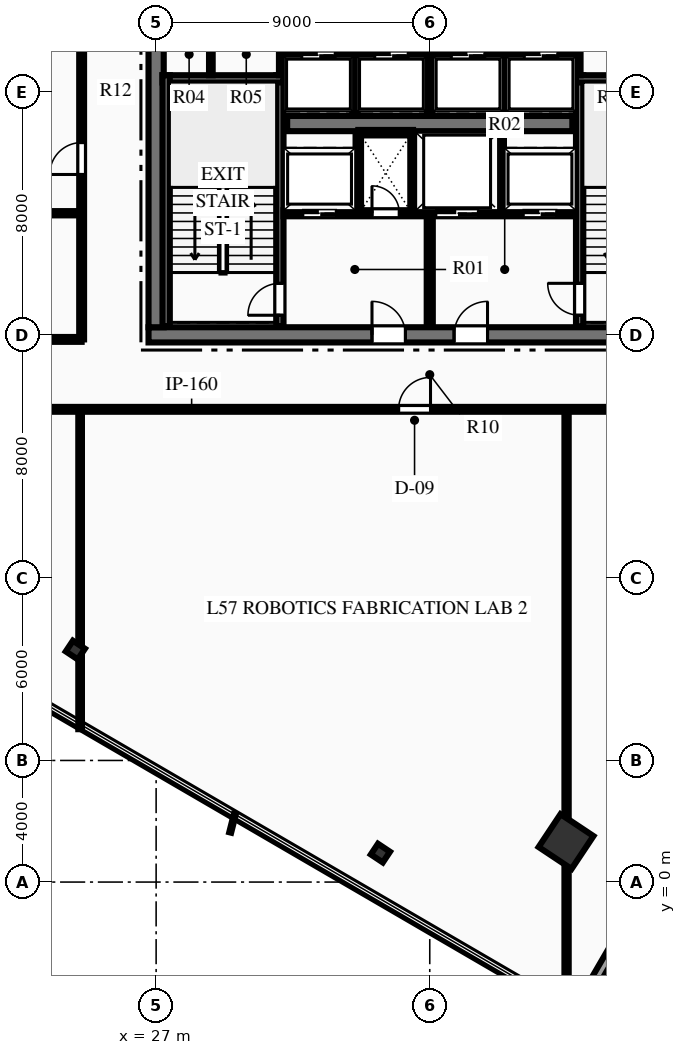
"""IFC4 building model, lengths in metres.
Left out: names, types, materials, properties, quantities, classifications, styles, units other than length and angle.
Written with IfcOpenShell. Run it as: python <this file> out.ifc"""

import sys

from ifc_helpers import new_model, si_unit, direction, frame, frame_2d, origin, origin_2d, place, context, subcontext, project, spatial, rectangle, hollow_rectangle, i_section, extrude, element, fill, save


model = new_model("IFC4")
c1 = context("Model", 3, precision=1e-05, world=origin(), true_north=direction((0.0, 1.0)))
c2 = subcontext(c1, "Body", "Model", "MODEL_VIEW")
j1 = project(units=[si_unit("LENGTHUNIT", "METRE"), si_unit("PLANEANGLEUNIT", "RADIAN")], contexts=[c1])
p1 = place(None, origin())
s1 = spatial("IfcSite", under=j1, at=p1, CompositionType="ELEMENT")
p2 = place(p1, origin())
s2 = spatial("IfcBuilding", under=s1, at=p2, CompositionType="ELEMENT")
p3 = place(p2, frame((0.0, 0.0, 228.45)))
s3 = spatial("IfcBuildingStorey", under=s2, at=p3, CompositionType="ELEMENT", Elevation=228.45)
p4 = place(p3, frame((26.75, 18.0, 0.0), z_axis=(0.0, 0.0, 1.0), x_axis=(1.0, 0.0, 0.0)))
e1 = element("IfcWall", 1, at=p4, inside=s3, PredefinedType="SHEAR", context=c2, shape_type="SweptSolid", body=[
    extrude(rectangle(XDim=18.5, YDim=0.5, at=frame_2d((9.25, 0.0))), origin(), (0.0, 0.0, 1.0), 3.75),
])
p5 = place(p4, frame((7.35, 0.0, 0.0)))
e2 = element("IfcOpeningElement", 2, at=p5, cuts=e1, PredefinedType="OPENING", context=c2, shape_type="SweptSolid", body=[
    extrude(rectangle(XDim=1.1, YDim=2.15, at=frame_2d((0.55, 1.075))), frame((0.0, 0.26, 0.0), z_axis=(0.0, -1.0, 0.0), x_axis=(1.0, 0.0, 0.0)), (0.0, 0.0, 1.0), 0.52),
])
p6 = place(p4, frame((10.05, 0.0, 0.0)))
e3 = element("IfcOpeningElement", 3, at=p6, cuts=e1, PredefinedType="OPENING", context=c2, shape_type="SweptSolid", body=[
    extrude(rectangle(XDim=1.1, YDim=2.15, at=frame_2d((0.55, 1.075))), frame((0.0, 0.26, 0.0), z_axis=(0.0, -1.0, 0.0), x_axis=(1.0, 0.0, 0.0)), (0.0, 0.0, 1.0), 0.52),
])
p7 = place(p3, frame((27.0, 18.25, 0.0), z_axis=(0.0, 0.0, 1.0), x_axis=(0.0, 1.0, 0.0)))
e4 = element("IfcWall", 4, at=p7, inside=s3, PredefinedType="SHEAR", context=c2, shape_type="SweptSolid", body=[
    extrude(rectangle(XDim=15.5, YDim=0.5, at=frame_2d((7.75, 0.0))), origin(), (0.0, 0.0, 1.0), 3.75),
])
p8 = place(p7, frame((9.99, 0.0, 0.0)))
e5 = element("IfcOpeningElement", 5, at=p8, cuts=e4, PredefinedType="OPENING", context=c2, shape_type="SweptSolid", body=[
    extrude(rectangle(XDim=1.4, YDim=2.2, at=frame_2d((0.7, 1.1))), frame((0.0, 0.26, 0.0), z_axis=(0.0, -1.0, 0.0), x_axis=(1.0, 0.0, 0.0)), (0.0, 0.0, 1.0), 0.52),
])
p9 = place(p3, frame((31.31, 24.95, 0.0), z_axis=(0.0, 0.0, 1.0), x_axis=(1.0, 0.0, 0.0)))
e6 = element("IfcWall", 6, at=p9, inside=s3, PredefinedType="SHEAR", context=c2, shape_type="SweptSolid", body=[
    extrude(rectangle(XDim=9.38, YDim=0.5, at=frame_2d((4.69, 0.0))), origin(), (0.0, 0.0, 1.0), 3.75),
])
p10 = place(p3, frame((31.07, 18.28, 0.0), z_axis=(0.0, 0.0, 1.0), x_axis=(0.0, 1.0, 0.0)))
e7 = element("IfcWall", 7, at=p10, inside=s3, PredefinedType="SHEAR", context=c2, shape_type="SweptSolid", body=[
    extrude(rectangle(XDim=8.26, YDim=0.24, at=frame_2d((4.13, 0.0))), origin(), (0.0, 0.0, 1.0), 3.75),
])
p11 = place(p10, frame((0.365, 0.0, 0.0)))
e8 = element("IfcOpeningElement", 8, at=p11, cuts=e7, PredefinedType="OPENING", context=c2, shape_type="SweptSolid", body=[
    extrude(rectangle(XDim=1.05, YDim=2.15, at=frame_2d((0.525, 1.075))), frame((0.0, 0.13, 0.0), z_axis=(0.0, -1.0, 0.0), x_axis=(1.0, 0.0, 0.0)), (0.0, 0.0, 1.0), 0.26),
])
p12 = place(p3, frame((27.21, 26.42, 0.0), z_axis=(0.0, 0.0, 1.0), x_axis=(1.0, 0.0, 0.0)))
e9 = element("IfcWall", 9, at=p12, inside=s3, PredefinedType="SHEAR", context=c2, shape_type="SweptSolid", body=[
    extrude(rectangle(XDim=3.98, YDim=0.24, at=frame_2d((1.99, 0.0))), origin(), (0.0, 0.0, 1.0), 3.75),
])
p13 = place(p3, frame((27.33, 18.28, 0.0), z_axis=(0.0, 0.0, 1.0), x_axis=(0.0, 1.0, 0.0)))
e10 = element("IfcWall", 10, at=p13, inside=s3, PredefinedType="SHEAR", context=c2, shape_type="SweptSolid", body=[
    extrude(rectangle(XDim=8.26, YDim=0.24, at=frame_2d((4.13, 0.0))), origin(), (0.0, 0.0, 1.0), 3.75),
])
p14 = place(p3, frame((40.93, 18.28, 0.0), z_axis=(0.0, 0.0, 1.0), x_axis=(0.0, 1.0, 0.0)))
e11 = element("IfcWall", 11, at=p14, inside=s3, PredefinedType="SHEAR", context=c2, shape_type="SweptSolid", body=[
    extrude(rectangle(XDim=8.26, YDim=0.24, at=frame_2d((4.13, 0.0))), origin(), (0.0, 0.0, 1.0), 3.75),
])
p15 = place(p14, frame((0.365, 0.0, 0.0)))
e12 = element("IfcOpeningElement", 12, at=p15, cuts=e11, PredefinedType="OPENING", context=c2, shape_type="SweptSolid", body=[
    extrude(rectangle(XDim=1.05, YDim=2.15, at=frame_2d((0.525, 1.075))), frame((0.0, 0.13, 0.0), z_axis=(0.0, -1.0, 0.0), x_axis=(1.0, 0.0, 0.0)), (0.0, 0.0, 1.0), 0.26),
])
p16 = place(p3, frame((40.81, 26.42, 0.0), z_axis=(0.0, 0.0, 1.0), x_axis=(1.0, 0.0, 0.0)))
e13 = element("IfcWall", 13, at=p16, inside=s3, PredefinedType="SHEAR", context=c2, shape_type="SweptSolid", body=[
    extrude(rectangle(XDim=3.98, YDim=0.24, at=frame_2d((1.99, 0.0))), origin(), (0.0, 0.0, 1.0), 3.75),
])
p17 = place(p3, frame((40.483, 1.333, 0.0), z_axis=(0.0, 0.0, 1.0), x_axis=(0.554118199338, 0.832437998389, 0.0)))
e14 = element("IfcColumn", 14, at=p17, inside=s3, PredefinedType="COLUMN", context=c2, shape_type="SweptSolid", body=[
    extrude(hollow_rectangle(XDim=1.3, YDim=1.3, WallThickness=0.06, at=origin_2d()), origin(), (0.0, 0.0, 1.0), 3.75),
])
for number, where, z_axis, x_axis in (
    (15, (24.343, 7.631, 0.0), (0.0, 0.0, 1.0), (0.554, 0.832, 0.0)),
    (16, (34.377, 0.952, 0.0), (0.0, 0.0, 1.0), (0.554, 0.832, 0.0)),
):
    element("IfcColumn", number, at=place(p3, frame(where, z_axis=z_axis, x_axis=x_axis)), inside=s3, PredefinedType="COLUMN", context=c2, shape_type="SweptSolid", body=[
        extrude(i_section(OverallWidth=0.424, OverallDepth=0.474, WebThickness=0.048, FlangeThickness=0.077, at=origin_2d()), origin(), (0.0, 0.0, 1.0), 3.75),
    ])
p18 = place(p3, frame((42.703, -1.1, 0.0), z_axis=(0.0, 0.0, 1.0), x_axis=(-0.503006671867, -0.864282527914, 0.0)))
e17 = element("IfcWall", 17, at=p18, inside=s3, PredefinedType="STANDARD", context=c2, shape_type="SweptSolid", body=[
    extrude(rectangle(XDim=3.9, YDim=0.32, at=frame_2d((1.95, 0.0))), origin(), (0.0, 0.0, 1.0), 3.47),
])
p19 = place(p3, frame((36.0, 18.28, 0.0), z_axis=(0.0, 0.0, 1.0), x_axis=(0.0, 1.0, 0.0)))
e18 = element("IfcWall", 18, at=p19, inside=s3, PredefinedType="PARTITIONING", context=c2, shape_type="SweptSolid", body=[
    extrude(rectangle(XDim=3.77, YDim=0.2, at=frame_2d((1.885, 0.0))), origin(), (0.0, 0.0, 1.0), 3.47),
])
p20 = place(p3, frame((31.19, 22.0, 0.0), z_axis=(0.0, 0.0, 1.0), x_axis=(1.0, 0.0, 0.0)))
e19 = element("IfcWall", 19, at=p20, inside=s3, PredefinedType="PARTITIONING", context=c2, shape_type="SweptSolid", body=[
    extrude(rectangle(XDim=4.69, YDim=0.2, at=frame_2d((2.345, 0.0))), origin(), (0.0, 0.0, 1.0), 3.47),
])
p21 = place(p20, frame((2.91, 0.0, 0.0)))
e20 = element("IfcOpeningElement", 20, at=p21, cuts=e19, PredefinedType="OPENING", context=c2, shape_type="SweptSolid", body=[
    extrude(rectangle(XDim=0.9, YDim=2.15, at=frame_2d((0.45, 1.075))), frame((0.0, 0.11, 0.0), z_axis=(0.0, -1.0, 0.0), x_axis=(1.0, 0.0, 0.0)), (0.0, 0.0, 1.0), 0.22),
])
p22 = place(p20, frame((0.635, 0.0, 0.0)))
e21 = element("IfcOpeningElement", 21, at=p22, cuts=e19, PredefinedType="OPENING", context=c2, shape_type="SweptSolid", body=[
    extrude(rectangle(XDim=1.1, YDim=2.15, at=frame_2d((0.55, 1.075))), frame((0.0, 0.11, 0.0), z_axis=(0.0, -1.0, 0.0), x_axis=(1.0, 0.0, 0.0)), (0.0, 0.0, 1.0), 0.22),
])
p23 = place(p3, frame((36.12, 22.0, 0.0), z_axis=(0.0, 0.0, 1.0), x_axis=(1.0, 0.0, 0.0)))
e22 = element("IfcWall", 22, at=p23, inside=s3, PredefinedType="PARTITIONING", context=c2, shape_type="SweptSolid", body=[
    extrude(rectangle(XDim=4.69, YDim=0.2, at=frame_2d((2.345, 0.0))), origin(), (0.0, 0.0, 1.0), 3.47),
])
p24 = place(p23, frame((2.955, 0.0, 0.0)))
e23 = element("IfcOpeningElement", 23, at=p24, cuts=e22, PredefinedType="OPENING", context=c2, shape_type="SweptSolid", body=[
    extrude(rectangle(XDim=1.1, YDim=2.15, at=frame_2d((0.55, 1.075))), frame((0.0, 0.11, 0.0), z_axis=(0.0, -1.0, 0.0), x_axis=(1.0, 0.0, 0.0)), (0.0, 0.0, 1.0), 0.22),
])
p25 = place(p23, frame((0.08, 0.0, 0.0)))
e24 = element("IfcOpeningElement", 24, at=p25, cuts=e22, PredefinedType="OPENING", context=c2, shape_type="SweptSolid", body=[
    extrude(rectangle(XDim=1.4, YDim=2.2, at=frame_2d((0.7, 1.1))), frame((0.0, 0.11, 0.0), z_axis=(0.0, -1.0, 0.0), x_axis=(1.0, 0.0, 0.0)), (0.0, 0.0, 1.0), 0.22),
])
for number, where, z_axis, x_axis in (
    (25, (33.65, 22.05, 0.0), (0.0, 0.0, 1.0), (0.0, 1.0, 0.0)),
    (26, (35.45, 22.05, 0.0), (0.0, 0.0, 1.0), (0.0, 1.0, 0.0)),
):
    element("IfcWall", number, at=place(p3, frame(where, z_axis=z_axis, x_axis=x_axis)), inside=s3, PredefinedType="PARTITIONING", context=c2, shape_type="SweptSolid", body=[
        extrude(rectangle(XDim=2.6, YDim=0.18, at=frame_2d((1.3, 0.0))), origin(), (0.0, 0.0, 1.0), 3.47),
    ])
p26 = place(p3, frame((33.65, 24.65, 0.0), z_axis=(0.0, 0.0, 1.0), x_axis=(1.0, 0.0, 0.0)))
e27 = element("IfcWall", 27, at=p26, inside=s3, PredefinedType="PARTITIONING", context=c2, shape_type="SweptSolid", body=[
    extrude(rectangle(XDim=1.8, YDim=0.18, at=frame_2d((0.9, 0.0))), origin(), (0.0, 0.0, 1.0), 3.47),
])
p27 = place(p3, frame((38.35, 22.05, 0.0), z_axis=(0.0, 0.0, 1.0), x_axis=(0.0, 1.0, 0.0)))
e28 = element("IfcWall", 28, at=p27, inside=s3, PredefinedType="PARTITIONING", context=c2, shape_type="SweptSolid", body=[
    extrude(rectangle(XDim=2.6, YDim=0.18, at=frame_2d((1.3, 0.0))), origin(), (0.0, 0.0, 1.0), 3.47),
])
for number, where, z_axis, x_axis in (
    (29, (31.12, 26.54, 0.0), (0.0, 0.0, 1.0), (0.0, 1.0, 0.0)),
    (30, (40.88, 26.54, 0.0), (0.0, 0.0, 1.0), (0.0, 1.0, 0.0)),
):
    element("IfcWall", number, at=place(p3, frame(where, z_axis=z_axis, x_axis=x_axis)), inside=s3, PredefinedType="PARTITIONING", context=c2, shape_type="SweptSolid", body=[
        extrude(rectangle(XDim=1.51, YDim=0.16, at=frame_2d((0.755, 0.0))), origin(), (0.0, 0.0, 1.0), 3.47),
    ])
p28 = place(p3, frame((28.8, 26.54, 0.0), z_axis=(0.0, 0.0, 1.0), x_axis=(0.0, 1.0, 0.0)))
e31 = element("IfcWall", 31, at=p28, inside=s3, PredefinedType="PARTITIONING", context=c2, shape_type="SweptSolid", body=[
    extrude(rectangle(XDim=1.44, YDim=0.12, at=frame_2d((0.72, 0.0))), origin(), (0.0, 0.0, 1.0), 3.47),
])
p29 = place(p3, frame((31.2, 27.2, 0.0), z_axis=(0.0, 0.0, 1.0), x_axis=(1.0, 0.0, 0.0)))
e32 = element("IfcWall", 32, at=p29, inside=s3, PredefinedType="PARTITIONING", context=c2, shape_type="SweptSolid", body=[
    extrude(rectangle(XDim=9.6, YDim=0.18, at=frame_2d((4.8, 0.0))), origin(), (0.0, 0.0, 1.0), 3.47),
])
p30 = place(p29, frame((0.59, 0.0, 0.0)))
e33 = element("IfcOpeningElement", 33, at=p30, cuts=e32, PredefinedType="OPENING", context=c2, shape_type="SweptSolid", body=[
    extrude(rectangle(XDim=1.1, YDim=2.15, at=frame_2d((0.55, 1.075))), frame((0.0, 0.1, 0.0), z_axis=(0.0, -1.0, 0.0), x_axis=(1.0, 0.0, 0.0)), (0.0, 0.0, 1.0), 0.2),
])
p31 = place(p29, frame((2.99, 0.0, 0.0)))
e34 = element("IfcOpeningElement", 34, at=p31, cuts=e32, PredefinedType="OPENING", context=c2, shape_type="SweptSolid", body=[
    extrude(rectangle(XDim=1.1, YDim=2.15, at=frame_2d((0.55, 1.075))), frame((0.0, 0.1, 0.0), z_axis=(0.0, -1.0, 0.0), x_axis=(1.0, 0.0, 0.0)), (0.0, 0.0, 1.0), 0.2),
])
p32 = place(p29, frame((5.51, 0.0, 0.0)))
e35 = element("IfcOpeningElement", 35, at=p32, cuts=e32, PredefinedType="OPENING", context=c2, shape_type="SweptSolid", body=[
    extrude(rectangle(XDim=1.1, YDim=2.15, at=frame_2d((0.55, 1.075))), frame((0.0, 0.1, 0.0), z_axis=(0.0, -1.0, 0.0), x_axis=(1.0, 0.0, 0.0)), (0.0, 0.0, 1.0), 0.2),
])
p33 = place(p29, frame((7.91, 0.0, 0.0)))
e36 = element("IfcOpeningElement", 36, at=p33, cuts=e32, PredefinedType="OPENING", context=c2, shape_type="SweptSolid", body=[
    extrude(rectangle(XDim=1.1, YDim=2.15, at=frame_2d((0.55, 1.075))), frame((0.0, 0.1, 0.0), z_axis=(0.0, -1.0, 0.0), x_axis=(1.0, 0.0, 0.0)), (0.0, 0.0, 1.0), 0.2),
])
for number, where, z_axis, x_axis in (
    (37, (33.54, 25.3, 0.0), (0.0, 0.0, 1.0), (0.0, 1.0, 0.0)),
    (38, (36.0, 25.3, 0.0), (0.0, 0.0, 1.0), (0.0, 1.0, 0.0)),
    (39, (38.46, 25.3, 0.0), (0.0, 0.0, 1.0), (0.0, 1.0, 0.0)),
):
    element("IfcWall", number, at=place(p3, frame(where, z_axis=z_axis, x_axis=x_axis)), inside=s3, PredefinedType="PARTITIONING", context=c2, shape_type="SweptSolid", body=[
        extrude(rectangle(XDim=1.9, YDim=0.18, at=frame_2d((0.95, 0.0))), origin(), (0.0, 0.0, 1.0), 3.47),
    ])
p34 = place(p3, frame((18.2, 15.55, 0.0), z_axis=(0.0, 0.0, 1.0), x_axis=(1.0, 0.0, 0.0)))
e40 = element("IfcWall", 40, at=p34, inside=s3, PredefinedType="PARTITIONING", context=c2, shape_type="SweptSolid", body=[
    extrude(rectangle(XDim=35.6, YDim=0.16, at=frame_2d((17.8, 0.0))), origin(), (0.0, 0.0, 1.0), 3.008),
])
p35 = place(p34, frame((3.587, 0.0, 0.0)))
e41 = element("IfcOpeningElement", 41, at=p35, cuts=e40, PredefinedType="OPENING", context=c2, shape_type="SweptSolid", body=[
    extrude(rectangle(XDim=1.05, YDim=2.15, at=frame_2d((0.525, 1.075))), frame((0.0, 0.09, 0.0), z_axis=(0.0, -1.0, 0.0), x_axis=(1.0, 0.0, 0.0)), (0.0, 0.0, 1.0), 0.18),
])
p36 = place(p34, frame((16.775, 0.0, 0.0)))
e42 = element("IfcOpeningElement", 42, at=p36, cuts=e40, PredefinedType="OPENING", context=c2, shape_type="SweptSolid", body=[
    extrude(rectangle(XDim=1.05, YDim=2.15, at=frame_2d((0.525, 1.075))), frame((0.0, 0.09, 0.0), z_axis=(0.0, -1.0, 0.0), x_axis=(1.0, 0.0, 0.0)), (0.0, 0.0, 1.0), 0.18),
])
p37 = place(p34, frame((24.055, 0.0, 0.0)))
e43 = element("IfcOpeningElement", 43, at=p37, cuts=e40, PredefinedType="OPENING", context=c2, shape_type="SweptSolid", body=[
    extrude(rectangle(XDim=1.05, YDim=2.15, at=frame_2d((0.525, 1.075))), frame((0.0, 0.09, 0.0), z_axis=(0.0, -1.0, 0.0), x_axis=(1.0, 0.0, 0.0)), (0.0, 0.0, 1.0), 0.18),
])
p38 = place(p34, frame((30.905, 0.0, 0.0)))
e44 = element("IfcOpeningElement", 44, at=p38, cuts=e40, PredefinedType="OPENING", context=c2, shape_type="SweptSolid", body=[
    extrude(rectangle(XDim=1.05, YDim=2.15, at=frame_2d((0.525, 1.075))), frame((0.0, 0.09, 0.0), z_axis=(0.0, -1.0, 0.0), x_axis=(1.0, 0.0, 0.0)), (0.0, 0.0, 1.0), 0.18),
])
p39 = place(p3, frame((18.2, 17.85, 0.0), z_axis=(0.0, 0.0, 1.0), x_axis=(1.0, 0.0, 0.0)))
e45 = element("IfcWall", 45, at=p39, inside=s3, PredefinedType="PARTITIONING", context=c2, shape_type="SweptSolid", body=[
    extrude(rectangle(XDim=6.35, YDim=0.16, at=frame_2d((3.175, 0.0))), origin(), (0.0, 0.0, 1.0), 3.47),
])
p40 = place(p39, frame((3.793, 0.0, 0.0)))
e46 = element("IfcOpeningElement", 46, at=p40, cuts=e45, PredefinedType="OPENING", context=c2, shape_type="SweptSolid", body=[
    extrude(rectangle(XDim=1.05, YDim=2.15, at=frame_2d((0.525, 1.075))), frame((0.0, 0.09, 0.0), z_axis=(0.0, -1.0, 0.0), x_axis=(1.0, 0.0, 0.0)), (0.0, 0.0, 1.0), 0.18),
])
p41 = place(p3, frame((24.55, 17.85, 0.0), z_axis=(0.0, 0.0, 1.0), x_axis=(0.0, 1.0, 0.0)))
e47 = element("IfcWall", 47, at=p41, inside=s3, PredefinedType="PARTITIONING", context=c2, shape_type="SweptSolid", body=[
    extrude(rectangle(XDim=16.3, YDim=0.16, at=frame_2d((8.15, 0.0))), origin(), (0.0, 0.0, 1.0), 3.47),
])
p42 = place(p41, frame((5.425, 0.0, 0.0)))
e48 = element("IfcOpeningElement", 48, at=p42, cuts=e47, PredefinedType="OPENING", context=c2, shape_type="SweptSolid", body=[
    extrude(rectangle(XDim=1.05, YDim=2.15, at=frame_2d((0.525, 1.075))), frame((0.0, 0.09, 0.0), z_axis=(0.0, -1.0, 0.0), x_axis=(1.0, 0.0, 0.0)), (0.0, 0.0, 1.0), 0.18),
])
p43 = place(p41, frame((11.367, 0.0, 0.0)))
e49 = element("IfcOpeningElement", 49, at=p43, cuts=e47, PredefinedType="OPENING", context=c2, shape_type="SweptSolid", body=[
    extrude(rectangle(XDim=1.05, YDim=2.15, at=frame_2d((0.525, 1.075))), frame((0.0, 0.09, 0.0), z_axis=(0.0, -1.0, 0.0), x_axis=(1.0, 0.0, 0.0)), (0.0, 0.0, 1.0), 0.18),
])
p44 = place(p3, frame((24.5, 5.028, 0.0), z_axis=(0.0, 0.0, 1.0), x_axis=(0.0, 1.0, 0.0)))
e50 = element("IfcWall", 50, at=p44, inside=s3, PredefinedType="PARTITIONING", context=c2, shape_type="SweptSolid", body=[
    extrude(rectangle(XDim=10.522, YDim=0.12, at=frame_2d((5.261, 0.0))), origin(), (0.0, 0.0, 1.0), 2.849),
])
p45 = place(p3, frame((40.5, -4.284, 0.0), z_axis=(0.0, 0.0, 1.0), x_axis=(0.0, 1.0, 0.0)))
e51 = element("IfcWall", 51, at=p45, inside=s3, PredefinedType="PARTITIONING", context=c2, shape_type="SweptSolid", body=[
    extrude(rectangle(XDim=19.834, YDim=0.14, at=frame_2d((9.917, 0.0))), origin(), (0.0, 0.0, 1.0), 2.849),
])
p46 = place(p3, frame((7.858, 22.0, 0.0), z_axis=(0.0, 0.0, 1.0), x_axis=(1.0, 0.0, 0.0)))
e52 = element("IfcWall", 52, at=p46, inside=s3, PredefinedType="PARTITIONING", context=c2, shape_type="SweptSolid", body=[
    extrude(rectangle(XDim=16.692, YDim=0.14, at=frame_2d((8.346, 0.0))), origin(), (0.0, 0.0, 1.0), 3.47),
])
p47 = place(p11, origin())
e53 = element("IfcDoor", 53, at=p47, inside=s3, OperationType="SINGLE_SWING_LEFT", PredefinedType="DOOR", context=c2, shape_type="SweptSolid", body=[
    extrude(rectangle(XDim=1.05, YDim=2.15, at=frame_2d((0.525, 1.075))), frame((0.0, 0.025, 0.0), z_axis=(0.0, -1.0, 0.0), x_axis=(1.0, 0.0, 0.0)), (0.0, 0.0, 1.0), 0.05),
])
fill(e8, e53)
p48 = place(p15, origin())
e54 = element("IfcDoor", 54, at=p48, inside=s3, OperationType="SINGLE_SWING_RIGHT", PredefinedType="DOOR", context=c2, shape_type="SweptSolid", body=[
    extrude(rectangle(XDim=1.05, YDim=2.15, at=frame_2d((0.525, 1.075))), frame((0.0, 0.025, 0.0), z_axis=(0.0, -1.0, 0.0), x_axis=(1.0, 0.0, 0.0)), (0.0, 0.0, 1.0), 0.05),
])
fill(e12, e54)
p49 = place(p5, origin())
e55 = element("IfcDoor", 55, at=p49, inside=s3, OperationType="SINGLE_SWING_LEFT", PredefinedType="DOOR", context=c2, shape_type="SweptSolid", body=[
    extrude(rectangle(XDim=1.1, YDim=2.15, at=frame_2d((0.55, 1.075))), frame((0.0, 0.025, 0.0), z_axis=(0.0, -1.0, 0.0), x_axis=(1.0, 0.0, 0.0)), (0.0, 0.0, 1.0), 0.05),
])
fill(e2, e55)
p50 = place(p6, origin())
e56 = element("IfcDoor", 56, at=p50, inside=s3, OperationType="SINGLE_SWING_RIGHT", PredefinedType="DOOR", context=c2, shape_type="SweptSolid", body=[
    extrude(rectangle(XDim=1.1, YDim=2.15, at=frame_2d((0.55, 1.075))), frame((0.0, 0.025, 0.0), z_axis=(0.0, -1.0, 0.0), x_axis=(1.0, 0.0, 0.0)), (0.0, 0.0, 1.0), 0.05),
])
fill(e3, e56)
p51 = place(p21, origin())
e57 = element("IfcDoor", 57, at=p51, inside=s3, OperationType="SINGLE_SWING_LEFT", PredefinedType="DOOR", context=c2, shape_type="SweptSolid", body=[
    extrude(rectangle(XDim=0.9, YDim=2.15, at=frame_2d((0.45, 1.075))), frame((0.0, 0.025, 0.0), z_axis=(0.0, -1.0, 0.0), x_axis=(1.0, 0.0, 0.0)), (0.0, 0.0, 1.0), 0.05),
])
fill(e20, e57)
p52 = place(p36, origin())
e58 = element("IfcDoor", 58, at=p52, inside=s3, OperationType="SINGLE_SWING_RIGHT", PredefinedType="DOOR", context=c2, shape_type="SweptSolid", body=[
    extrude(rectangle(XDim=1.05, YDim=2.15, at=frame_2d((0.525, 1.075))), frame((0.0, 0.025, 0.0), z_axis=(0.0, -1.0, 0.0), x_axis=(1.0, 0.0, 0.0)), (0.0, 0.0, 1.0), 0.05),
])
fill(e42, e58)
p53 = place(p42, origin())
e59 = element("IfcDoor", 59, at=p53, inside=s3, OperationType="SINGLE_SWING_LEFT", PredefinedType="DOOR", context=c2, shape_type="SweptSolid", body=[
    extrude(rectangle(XDim=1.05, YDim=2.15, at=frame_2d((0.525, 1.075))), frame((0.0, 0.025, 0.0), z_axis=(0.0, -1.0, 0.0), x_axis=(1.0, 0.0, 0.0)), (0.0, 0.0, 1.0), 0.05),
])
fill(e48, e59)
p54 = place(p30, origin())
e60 = element("IfcDoor", 60, at=p54, inside=s3, OperationType="SLIDING_TO_LEFT", PredefinedType="DOOR", context=c2, shape_type="SweptSolid", body=[
    extrude(rectangle(XDim=1.1, YDim=2.15, at=frame_2d((0.55, 1.075))), frame((0.0, 0.025, 0.0), z_axis=(0.0, -1.0, 0.0), x_axis=(1.0, 0.0, 0.0)), (0.0, 0.0, 1.0), 0.05),
])
fill(e33, e60)
p55 = place(p31, origin())
e61 = element("IfcDoor", 61, at=p55, inside=s3, OperationType="SLIDING_TO_LEFT", PredefinedType="DOOR", context=c2, shape_type="SweptSolid", body=[
    extrude(rectangle(XDim=1.1, YDim=2.15, at=frame_2d((0.55, 1.075))), frame((0.0, 0.025, 0.0), z_axis=(0.0, -1.0, 0.0), x_axis=(1.0, 0.0, 0.0)), (0.0, 0.0, 1.0), 0.05),
])
fill(e34, e61)
p56 = place(p32, origin())
e62 = element("IfcDoor", 62, at=p56, inside=s3, OperationType="SLIDING_TO_LEFT", PredefinedType="DOOR", context=c2, shape_type="SweptSolid", body=[
    extrude(rectangle(XDim=1.1, YDim=2.15, at=frame_2d((0.55, 1.075))), frame((0.0, 0.025, 0.0), z_axis=(0.0, -1.0, 0.0), x_axis=(1.0, 0.0, 0.0)), (0.0, 0.0, 1.0), 0.05),
])
fill(e35, e62)
p57 = place(p33, origin())
e63 = element("IfcDoor", 63, at=p57, inside=s3, OperationType="SLIDING_TO_LEFT", PredefinedType="DOOR", context=c2, shape_type="SweptSolid", body=[
    extrude(rectangle(XDim=1.1, YDim=2.15, at=frame_2d((0.55, 1.075))), frame((0.0, 0.025, 0.0), z_axis=(0.0, -1.0, 0.0), x_axis=(1.0, 0.0, 0.0)), (0.0, 0.0, 1.0), 0.05),
])
fill(e36, e63)
p58 = place(p22, origin())
e64 = element("IfcDoor", 64, at=p58, inside=s3, OperationType="SLIDING_TO_LEFT", PredefinedType="DOOR", context=c2, shape_type="SweptSolid", body=[
    extrude(rectangle(XDim=1.1, YDim=2.15, at=frame_2d((0.55, 1.075))), frame((0.0, 0.025, 0.0), z_axis=(0.0, -1.0, 0.0), x_axis=(1.0, 0.0, 0.0)), (0.0, 0.0, 1.0), 0.05),
])
fill(e21, e64)
p59 = place(p24, origin())
e65 = element("IfcDoor", 65, at=p59, inside=s3, OperationType="SLIDING_TO_LEFT", PredefinedType="DOOR", context=c2, shape_type="SweptSolid", body=[
    extrude(rectangle(XDim=1.1, YDim=2.15, at=frame_2d((0.55, 1.075))), frame((0.0, 0.025, 0.0), z_axis=(0.0, -1.0, 0.0), x_axis=(1.0, 0.0, 0.0)), (0.0, 0.0, 1.0), 0.05),
])
fill(e23, e65)
p60 = place(p25, origin())
e66 = element("IfcDoor", 66, at=p60, inside=s3, OperationType="SLIDING_TO_LEFT", PredefinedType="DOOR", context=c2, shape_type="SweptSolid", body=[
    extrude(rectangle(XDim=1.4, YDim=2.2, at=frame_2d((0.7, 1.1))), frame((0.0, 0.025, 0.0), z_axis=(0.0, -1.0, 0.0), x_axis=(1.0, 0.0, 0.0)), (0.0, 0.0, 1.0), 0.05),
])
fill(e24, e66)
save(model, sys.argv[1])
